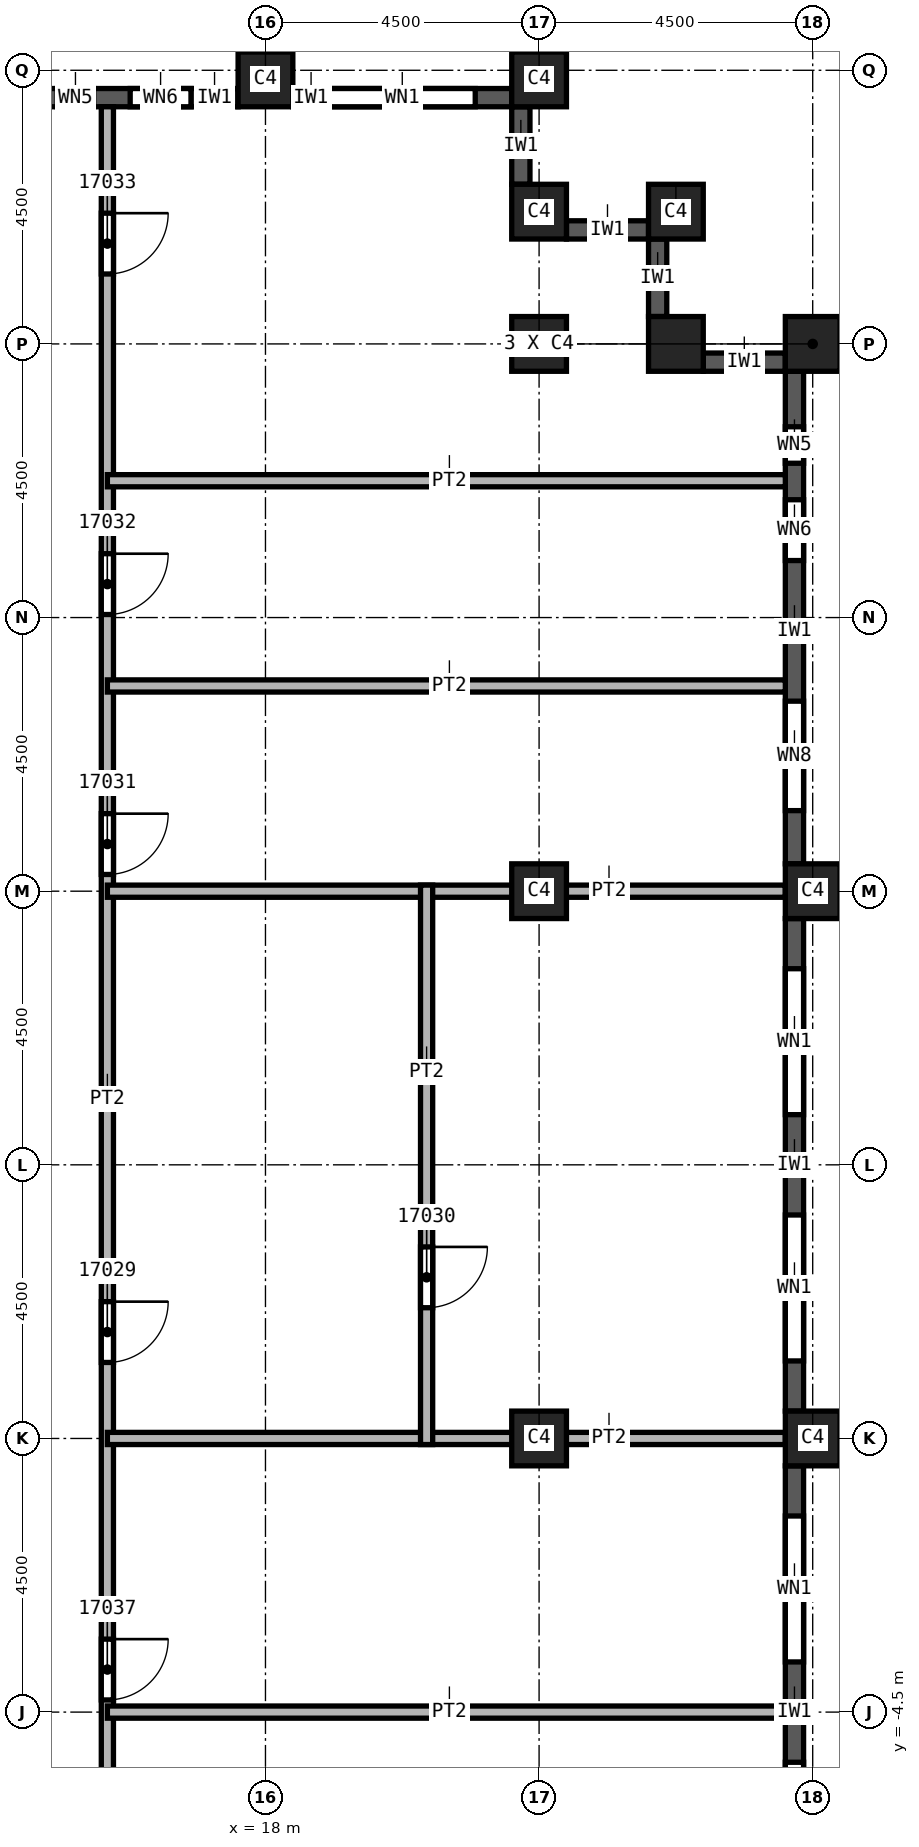
"""IFC4 building model, lengths in metres.
Left out: names, types, materials, properties, quantities, classifications, styles, units other than length and angle.
Written with IfcOpenShell. Run it as: python <this file> out.ifc"""

import sys

from ifc_helpers import new_model, si_unit, direction, frame, frame_2d, origin, origin_2d, place, context, subcontext, project, spatial, rectangle, extrude, element, fill, save


model = new_model("IFC4")
c1 = context("Model", 3, precision=1e-05, world=origin(), true_north=direction((0.0, 1.0)))
c2 = subcontext(c1, "Body", "Model", "MODEL_VIEW")
j1 = project(units=[si_unit("LENGTHUNIT", "METRE"), si_unit("PLANEANGLEUNIT", "RADIAN")], contexts=[c1])
p1 = place(None, origin())
s1 = spatial("IfcSite", under=j1, at=p1, CompositionType="ELEMENT")
p2 = place(p1, origin())
s2 = spatial("IfcBuilding", under=s1, at=p2, CompositionType="ELEMENT")
p3 = place(p2, frame((0.0, 0.0, 254.0)))
s3 = spatial("IfcBuildingStorey", under=s2, at=p3, CompositionType="ELEMENT", Elevation=254.0)
for number, where, z_axis, x_axis in (
    (1, (22.5, 0.0, 0.0), (0.0, 0.0, 1.0), (1.0, 0.0, 0.0)),
    (2, (22.5, 9.0, 0.0), (0.0, 0.0, 1.0), (1.0, 0.0, 0.0)),
    (3, (22.5, 18.0, 0.0), (0.0, 0.0, 1.0), (1.0, 0.0, 0.0)),
    (4, (27.0, 0.0, 0.0), (0.0, 0.0, 1.0), (0.0, 1.0, 0.0)),
    (5, (27.0, 9.0, 0.0), (0.0, 0.0, 1.0), (0.0, 1.0, 0.0)),
    (6, (27.0, 18.0, 0.0), (0.0, 0.0, 1.0), (0.0, 1.0, 0.0)),
    (7, (18.0, 22.35, 0.0), (0.0, 0.0, 1.0), (1.0, 0.0, 0.0)),
    (8, (22.5, 22.35, 0.0), (0.0, 0.0, 1.0), (1.0, 0.0, 0.0)),
    (9, (22.5, 20.175, 0.0), (0.0, 0.0, 1.0), (1.0, 0.0, 0.0)),
    (10, (24.75, 20.175, 0.0), (0.0, 0.0, 1.0), (1.0, 0.0, 0.0)),
    (11, (24.75, 18.0, 0.0), (0.0, 0.0, 1.0), (1.0, 0.0, 0.0)),
):
    element("IfcColumn", number, at=place(p3, frame(where, z_axis=z_axis, x_axis=x_axis)), inside=s3, PredefinedType="COLUMN", context=c2, shape_type="SweptSolid", body=[
        extrude(rectangle(XDim=0.9, YDim=0.9, at=origin_2d()), origin(), (0.0, 0.0, 1.0), 3.72),
    ])
p4 = place(p3, frame((26.7, -8.55, 0.0), z_axis=(0.0, 0.0, 1.0), x_axis=(0.0, 1.0, 0.0)))
e12 = element("IfcWall", 12, at=p4, inside=s3, PredefinedType="SOLIDWALL", context=c2, shape_type="SweptSolid", body=[
    extrude(rectangle(XDim=8.1, YDim=0.3, at=frame_2d((4.05, 0.0))), origin(), (0.0, 0.0, 1.0), 3.12),
])
p5 = place(p4, frame((0.825, 0.0, 0.8)))
e13 = element("IfcOpeningElement", 13, at=p5, cuts=e12, PredefinedType="OPENING", context=c2, shape_type="SweptSolid", body=[
    extrude(rectangle(XDim=2.4, YDim=1.95, at=frame_2d((1.2, 0.975))), frame((0.0, 0.15, 0.0), z_axis=(0.0, -1.0, 0.0), x_axis=(1.0, 0.0, 0.0)), (0.0, 0.0, 1.0), 0.3),
])
p6 = place(p4, frame((4.875, 0.0, 0.8)))
e14 = element("IfcOpeningElement", 14, at=p6, cuts=e12, PredefinedType="OPENING", context=c2, shape_type="SweptSolid", body=[
    extrude(rectangle(XDim=2.4, YDim=1.95, at=frame_2d((1.2, 0.975))), frame((0.0, 0.15, 0.0), z_axis=(0.0, -1.0, 0.0), x_axis=(1.0, 0.0, 0.0)), (0.0, 0.0, 1.0), 0.3),
])
p7 = place(p3, frame((26.7, 0.45, 0.0), z_axis=(0.0, 0.0, 1.0), x_axis=(0.0, 1.0, 0.0)))
e15 = element("IfcWall", 15, at=p7, inside=s3, PredefinedType="SOLIDWALL", context=c2, shape_type="SweptSolid", body=[
    extrude(rectangle(XDim=8.1, YDim=0.3, at=frame_2d((4.05, 0.0))), origin(), (0.0, 0.0, 1.0), 3.12),
])
p8 = place(p7, frame((0.825, 0.0, 0.8)))
e16 = element("IfcOpeningElement", 16, at=p8, cuts=e15, PredefinedType="OPENING", context=c2, shape_type="SweptSolid", body=[
    extrude(rectangle(XDim=2.4, YDim=1.95, at=frame_2d((1.2, 0.975))), frame((0.0, 0.15, 0.0), z_axis=(0.0, -1.0, 0.0), x_axis=(1.0, 0.0, 0.0)), (0.0, 0.0, 1.0), 0.3),
])
p9 = place(p7, frame((4.875, 0.0, 0.8)))
e17 = element("IfcOpeningElement", 17, at=p9, cuts=e15, PredefinedType="OPENING", context=c2, shape_type="SweptSolid", body=[
    extrude(rectangle(XDim=2.4, YDim=1.95, at=frame_2d((1.2, 0.975))), frame((0.0, 0.15, 0.0), z_axis=(0.0, -1.0, 0.0), x_axis=(1.0, 0.0, 0.0)), (0.0, 0.0, 1.0), 0.3),
])
p10 = place(p3, frame((26.7, 9.45, 0.0), z_axis=(0.0, 0.0, 1.0), x_axis=(0.0, 1.0, 0.0)))
e18 = element("IfcWall", 18, at=p10, inside=s3, PredefinedType="SOLIDWALL", context=c2, shape_type="SweptSolid", body=[
    extrude(rectangle(XDim=8.1, YDim=0.3, at=frame_2d((4.05, 0.0))), origin(), (0.0, 0.0, 1.0), 3.12),
])
p11 = place(p10, frame((0.875, 0.0, 0.8)))
e19 = element("IfcOpeningElement", 19, at=p11, cuts=e18, PredefinedType="OPENING", context=c2, shape_type="SweptSolid", body=[
    extrude(rectangle(XDim=1.8, YDim=1.95, at=frame_2d((0.9, 0.975))), frame((0.0, 0.15, 0.0), z_axis=(0.0, -1.0, 0.0), x_axis=(1.0, 0.0, 0.0)), (0.0, 0.0, 1.0), 0.3),
])
p12 = place(p10, frame((4.988, 0.0, 0.8)))
e20 = element("IfcOpeningElement", 20, at=p12, cuts=e18, PredefinedType="OPENING", context=c2, shape_type="SweptSolid", body=[
    extrude(rectangle(XDim=1.0, YDim=1.95, at=frame_2d((0.5, 0.975))), frame((0.0, 0.15, 0.0), z_axis=(0.0, -1.0, 0.0), x_axis=(1.0, 0.0, 0.0)), (0.0, 0.0, 1.0), 0.3),
])
p13 = place(p10, frame((6.587, 0.0, 0.8)))
e21 = element("IfcOpeningElement", 21, at=p13, cuts=e18, PredefinedType="OPENING", context=c2, shape_type="SweptSolid", body=[
    extrude(rectangle(XDim=0.6, YDim=1.95, at=frame_2d((0.3, 0.975))), frame((0.0, 0.15, 0.0), z_axis=(0.0, -1.0, 0.0), x_axis=(1.0, 0.0, 0.0)), (0.0, 0.0, 1.0), 0.3),
])
p14 = place(p3, frame((26.55, 17.7, 0.0), z_axis=(0.0, 0.0, 1.0), x_axis=(-1.0, 0.0, 0.0)))
e22 = element("IfcWall", 22, at=p14, inside=s3, PredefinedType="SOLIDWALL", context=c2, shape_type="SweptSolid", body=[
    extrude(rectangle(XDim=1.35, YDim=0.3, at=frame_2d((0.675, 0.0))), origin(), (0.0, 0.0, 1.0), 3.12),
])
p15 = place(p3, frame((24.45, 18.45, 0.0), z_axis=(0.0, 0.0, 1.0), x_axis=(0.0, 1.0, 0.0)))
e23 = element("IfcWall", 23, at=p15, inside=s3, PredefinedType="SOLIDWALL", context=c2, shape_type="SweptSolid", body=[
    extrude(rectangle(XDim=1.275, YDim=0.3, at=frame_2d((0.638, 0.0))), origin(), (0.0, 0.0, 1.0), 3.12),
])
p16 = place(p3, frame((24.3, 19.875, 0.0), z_axis=(0.0, 0.0, 1.0), x_axis=(-1.0, 0.0, 0.0)))
e24 = element("IfcWall", 24, at=p16, inside=s3, PredefinedType="SOLIDWALL", context=c2, shape_type="SweptSolid", body=[
    extrude(rectangle(XDim=1.35, YDim=0.3, at=frame_2d((0.675, 0.0))), origin(), (0.0, 0.0, 1.0), 3.12),
])
p17 = place(p3, frame((22.2, 20.625, 0.0), z_axis=(0.0, 0.0, 1.0), x_axis=(0.0, 1.0, 0.0)))
e25 = element("IfcWall", 25, at=p17, inside=s3, PredefinedType="SOLIDWALL", context=c2, shape_type="SweptSolid", body=[
    extrude(rectangle(XDim=1.275, YDim=0.3, at=frame_2d((0.637, 0.0))), origin(), (0.0, 0.0, 1.0), 3.12),
])
p18 = place(p3, frame((22.05, 22.05, 0.0), z_axis=(0.0, 0.0, 1.0), x_axis=(-1.0, 0.0, 0.0)))
e26 = element("IfcWall", 26, at=p18, inside=s3, PredefinedType="SOLIDWALL", context=c2, shape_type="SweptSolid", body=[
    extrude(rectangle(XDim=3.6, YDim=0.3, at=frame_2d((1.8, 0.0))), origin(), (0.0, 0.0, 1.0), 3.12),
])
p19 = place(p18, frame((0.6, 0.0, 0.8)))
e27 = element("IfcOpeningElement", 27, at=p19, cuts=e26, PredefinedType="OPENING", context=c2, shape_type="SweptSolid", body=[
    extrude(rectangle(XDim=2.4, YDim=1.95, at=frame_2d((1.2, 0.975))), frame((0.0, 0.15, 0.0), z_axis=(0.0, -1.0, 0.0), x_axis=(1.0, 0.0, 0.0)), (0.0, 0.0, 1.0), 0.3),
])
p20 = place(p3, frame((17.55, 22.05, 0.0), z_axis=(0.0, 0.0, 1.0), x_axis=(-1.0, 0.0, 0.0)))
e28 = element("IfcWall", 28, at=p20, inside=s3, PredefinedType="SOLIDWALL", context=c2, shape_type="SweptSolid", body=[
    extrude(rectangle(XDim=3.6, YDim=0.3, at=frame_2d((1.8, 0.0))), origin(), (0.0, 0.0, 1.0), 3.12),
])
p21 = place(p20, frame((0.775, 0.0, 0.8)))
e29 = element("IfcOpeningElement", 29, at=p21, cuts=e28, PredefinedType="OPENING", context=c2, shape_type="SweptSolid", body=[
    extrude(rectangle(XDim=1.0, YDim=1.95, at=frame_2d((0.5, 0.975))), frame((0.0, 0.15, 0.0), z_axis=(0.0, -1.0, 0.0), x_axis=(1.0, 0.0, 0.0)), (0.0, 0.0, 1.0), 0.3),
])
p22 = place(p20, frame((2.375, 0.0, 0.8)))
e30 = element("IfcOpeningElement", 30, at=p22, cuts=e28, PredefinedType="OPENING", context=c2, shape_type="SweptSolid", body=[
    extrude(rectangle(XDim=0.6, YDim=1.95, at=frame_2d((0.3, 0.975))), frame((0.0, 0.15, 0.0), z_axis=(0.0, -1.0, 0.0), x_axis=(1.0, 0.0, 0.0)), (0.0, 0.0, 1.0), 0.3),
])
p23 = place(p3, frame((15.4, 21.9, 0.0), z_axis=(0.0, 0.0, 1.0), x_axis=(0.0, -1.0, 0.0)))
e31 = element("IfcWall", 31, at=p23, inside=s3, PredefinedType="PARTITIONING", context=c2, shape_type="SweptSolid", body=[
    extrude(rectangle(XDim=43.8, YDim=0.2, at=frame_2d((21.9, 0.0))), origin(), (0.0, 0.0, 1.0), 3.72),
])
p24 = place(p23, frame((19.65, 0.0, 0.0)))
e32 = element("IfcOpeningElement", 32, at=p24, cuts=e31, PredefinedType="OPENING", context=c2, shape_type="SweptSolid", body=[
    extrude(rectangle(XDim=1.0, YDim=2.1, at=frame_2d((0.5, 1.05))), frame((0.0, 0.1, 0.0), z_axis=(0.0, -1.0, 0.0), x_axis=(1.0, 0.0, 0.0)), (0.0, 0.0, 1.0), 0.2),
])
p25 = place(p23, frame((11.625, 0.0, 0.0)))
e33 = element("IfcOpeningElement", 33, at=p25, cuts=e31, PredefinedType="OPENING", context=c2, shape_type="SweptSolid", body=[
    extrude(rectangle(XDim=1.0, YDim=2.1, at=frame_2d((0.5, 1.05))), frame((0.0, 0.1, 0.0), z_axis=(0.0, -1.0, 0.0), x_axis=(1.0, 0.0, 0.0)), (0.0, 0.0, 1.0), 0.2),
])
p26 = place(p23, frame((7.35, 0.0, 0.0)))
e34 = element("IfcOpeningElement", 34, at=p26, cuts=e31, PredefinedType="OPENING", context=c2, shape_type="SweptSolid", body=[
    extrude(rectangle(XDim=1.0, YDim=2.1, at=frame_2d((0.5, 1.05))), frame((0.0, 0.1, 0.0), z_axis=(0.0, -1.0, 0.0), x_axis=(1.0, 0.0, 0.0)), (0.0, 0.0, 1.0), 0.2),
])
p27 = place(p23, frame((1.75, 0.0, 0.0)))
e35 = element("IfcOpeningElement", 35, at=p27, cuts=e31, PredefinedType="OPENING", context=c2, shape_type="SweptSolid", body=[
    extrude(rectangle(XDim=1.0, YDim=2.1, at=frame_2d((0.5, 1.05))), frame((0.0, 0.1, 0.0), z_axis=(0.0, -1.0, 0.0), x_axis=(1.0, 0.0, 0.0)), (0.0, 0.0, 1.0), 0.2),
])
p28 = place(p23, frame((37.2, 0.0, 0.0)))
e36 = element("IfcOpeningElement", 36, at=p28, cuts=e31, PredefinedType="OPENING", context=c2, shape_type="SweptSolid", body=[
    extrude(rectangle(XDim=1.0, YDim=2.1, at=frame_2d((0.5, 1.05))), frame((0.0, 0.1, 0.0), z_axis=(0.0, -1.0, 0.0), x_axis=(1.0, 0.0, 0.0)), (0.0, 0.0, 1.0), 0.2),
])
p29 = place(p23, frame((31.8, 0.0, 0.0)))
e37 = element("IfcOpeningElement", 37, at=p29, cuts=e31, PredefinedType="OPENING", context=c2, shape_type="SweptSolid", body=[
    extrude(rectangle(XDim=1.0, YDim=2.1, at=frame_2d((0.5, 1.05))), frame((0.0, 0.1, 0.0), z_axis=(0.0, -1.0, 0.0), x_axis=(1.0, 0.0, 0.0)), (0.0, 0.0, 1.0), 0.2),
])
p30 = place(p23, frame((25.2, 0.0, 0.0)))
e38 = element("IfcOpeningElement", 38, at=p30, cuts=e31, PredefinedType="OPENING", context=c2, shape_type="SweptSolid", body=[
    extrude(rectangle(XDim=1.0, YDim=2.1, at=frame_2d((0.5, 1.05))), frame((0.0, 0.1, 0.0), z_axis=(0.0, -1.0, 0.0), x_axis=(1.0, 0.0, 0.0)), (0.0, 0.0, 1.0), 0.2),
])
for number, where, z_axis, x_axis in (
    (39, (15.4, -4.5, 0.0), (0.0, 0.0, 1.0), (1.0, 0.0, 0.0)),
    (40, (15.4, 9.0, 0.0), (0.0, 0.0, 1.0), (1.0, 0.0, 0.0)),
    (41, (15.4, 12.375, 0.0), (0.0, 0.0, 1.0), (1.0, 0.0, 0.0)),
    (42, (15.4, 15.75, 0.0), (0.0, 0.0, 1.0), (1.0, 0.0, 0.0)),
    (43, (26.55, 0.0, 0.0), (0.0, 0.0, 1.0), (-1.0, 0.0, 0.0)),
):
    element("IfcWall", number, at=place(p3, frame(where, z_axis=z_axis, x_axis=x_axis)), inside=s3, PredefinedType="PARTITIONING", context=c2, shape_type="SweptSolid", body=[
        extrude(rectangle(XDim=11.15, YDim=0.2, at=frame_2d((5.575, 0.0))), origin(), (0.0, 0.0, 1.0), 3.72),
    ])
p31 = place(p3, frame((20.65, 9.1, 0.0), z_axis=(0.0, 0.0, 1.0), x_axis=(0.0, -1.0, 0.0)))
e44 = element("IfcWall", 44, at=p31, inside=s3, PredefinedType="PARTITIONING", context=c2, shape_type="SweptSolid", body=[
    extrude(rectangle(XDim=9.2, YDim=0.2, at=frame_2d((4.6, 0.0))), origin(), (0.0, 0.0, 1.0), 3.72),
])
p32 = place(p31, frame((5.95, 0.0, 0.0)))
e45 = element("IfcOpeningElement", 45, at=p32, cuts=e44, PredefinedType="OPENING", context=c2, shape_type="SweptSolid", body=[
    extrude(rectangle(XDim=1.0, YDim=2.1, at=frame_2d((0.5, 1.05))), frame((0.0, 0.1, 0.0), z_axis=(0.0, -1.0, 0.0), x_axis=(1.0, 0.0, 0.0)), (0.0, 0.0, 1.0), 0.2),
])
p33 = place(p5, origin())
e46 = element("IfcWindow", 46, at=p33, inside=s3, PartitioningType="SINGLE_PANEL", PredefinedType="WINDOW", context=c2, shape_type="SweptSolid", body=[
    extrude(rectangle(XDim=2.4, YDim=1.95, at=frame_2d((1.2, 0.975))), frame((0.0, 0.03, 0.0), z_axis=(0.0, -1.0, 0.0), x_axis=(1.0, 0.0, 0.0)), (0.0, 0.0, 1.0), 0.06),
])
fill(e13, e46)
p34 = place(p6, origin())
e47 = element("IfcWindow", 47, at=p34, inside=s3, PartitioningType="SINGLE_PANEL", PredefinedType="WINDOW", context=c2, shape_type="SweptSolid", body=[
    extrude(rectangle(XDim=2.4, YDim=1.95, at=frame_2d((1.2, 0.975))), frame((0.0, 0.03, 0.0), z_axis=(0.0, -1.0, 0.0), x_axis=(1.0, 0.0, 0.0)), (0.0, 0.0, 1.0), 0.06),
])
fill(e14, e47)
p35 = place(p8, origin())
e48 = element("IfcWindow", 48, at=p35, inside=s3, PartitioningType="SINGLE_PANEL", PredefinedType="WINDOW", context=c2, shape_type="SweptSolid", body=[
    extrude(rectangle(XDim=2.4, YDim=1.95, at=frame_2d((1.2, 0.975))), frame((0.0, 0.03, 0.0), z_axis=(0.0, -1.0, 0.0), x_axis=(1.0, 0.0, 0.0)), (0.0, 0.0, 1.0), 0.06),
])
fill(e16, e48)
p36 = place(p9, origin())
e49 = element("IfcWindow", 49, at=p36, inside=s3, PartitioningType="SINGLE_PANEL", PredefinedType="WINDOW", context=c2, shape_type="SweptSolid", body=[
    extrude(rectangle(XDim=2.4, YDim=1.95, at=frame_2d((1.2, 0.975))), frame((0.0, 0.03, 0.0), z_axis=(0.0, -1.0, 0.0), x_axis=(1.0, 0.0, 0.0)), (0.0, 0.0, 1.0), 0.06),
])
fill(e17, e49)
p37 = place(p19, origin())
e50 = element("IfcWindow", 50, at=p37, inside=s3, PartitioningType="SINGLE_PANEL", PredefinedType="WINDOW", context=c2, shape_type="SweptSolid", body=[
    extrude(rectangle(XDim=2.4, YDim=1.95, at=frame_2d((1.2, 0.975))), frame((0.0, 0.03, 0.0), z_axis=(0.0, -1.0, 0.0), x_axis=(1.0, 0.0, 0.0)), (0.0, 0.0, 1.0), 0.06),
])
fill(e27, e50)
p38 = place(p24, origin())
e51 = element("IfcDoor", 51, at=p38, inside=s3, OperationType="SINGLE_SWING_RIGHT", PredefinedType="DOOR", context=c2, shape_type="SweptSolid", body=[
    extrude(rectangle(XDim=1.0, YDim=2.1, at=frame_2d((0.5, 1.05))), frame((0.0, 0.025, 0.0), z_axis=(0.0, -1.0, 0.0), x_axis=(1.0, 0.0, 0.0)), (0.0, 0.0, 1.0), 0.05),
])
fill(e32, e51)
p39 = place(p32, origin())
e52 = element("IfcDoor", 52, at=p39, inside=s3, OperationType="SINGLE_SWING_LEFT", PredefinedType="DOOR", context=c2, shape_type="SweptSolid", body=[
    extrude(rectangle(XDim=1.0, YDim=2.1, at=frame_2d((0.5, 1.05))), frame((0.0, 0.025, 0.0), z_axis=(0.0, -1.0, 0.0), x_axis=(1.0, 0.0, 0.0)), (0.0, 0.0, 1.0), 0.05),
])
fill(e45, e52)
p40 = place(p25, origin())
e53 = element("IfcDoor", 53, at=p40, inside=s3, OperationType="SINGLE_SWING_RIGHT", PredefinedType="DOOR", context=c2, shape_type="SweptSolid", body=[
    extrude(rectangle(XDim=1.0, YDim=2.1, at=frame_2d((0.5, 1.05))), frame((0.0, 0.025, 0.0), z_axis=(0.0, -1.0, 0.0), x_axis=(1.0, 0.0, 0.0)), (0.0, 0.0, 1.0), 0.05),
])
fill(e33, e53)
p41 = place(p26, origin())
e54 = element("IfcDoor", 54, at=p41, inside=s3, OperationType="SINGLE_SWING_LEFT", PredefinedType="DOOR", context=c2, shape_type="SweptSolid", body=[
    extrude(rectangle(XDim=1.0, YDim=2.1, at=frame_2d((0.5, 1.05))), frame((0.0, 0.025, 0.0), z_axis=(0.0, -1.0, 0.0), x_axis=(1.0, 0.0, 0.0)), (0.0, 0.0, 1.0), 0.05),
])
fill(e34, e54)
p42 = place(p27, origin())
e55 = element("IfcDoor", 55, at=p42, inside=s3, OperationType="SINGLE_SWING_RIGHT", PredefinedType="DOOR", context=c2, shape_type="SweptSolid", body=[
    extrude(rectangle(XDim=1.0, YDim=2.1, at=frame_2d((0.5, 1.05))), frame((0.0, 0.025, 0.0), z_axis=(0.0, -1.0, 0.0), x_axis=(1.0, 0.0, 0.0)), (0.0, 0.0, 1.0), 0.05),
])
fill(e35, e55)
p43 = place(p30, origin())
e56 = element("IfcDoor", 56, at=p43, inside=s3, OperationType="SINGLE_SWING_RIGHT", PredefinedType="DOOR", context=c2, shape_type="SweptSolid", body=[
    extrude(rectangle(XDim=1.0, YDim=2.1, at=frame_2d((0.5, 1.05))), frame((0.0, 0.025, 0.0), z_axis=(0.0, -1.0, 0.0), x_axis=(1.0, 0.0, 0.0)), (0.0, 0.0, 1.0), 0.05),
])
fill(e38, e56)
p44 = place(p11, origin())
e57 = element("IfcWindow", 57, at=p44, inside=s3, PartitioningType="SINGLE_PANEL", PredefinedType="WINDOW", context=c2, shape_type="SweptSolid", body=[
    extrude(rectangle(XDim=1.8, YDim=1.95, at=frame_2d((0.9, 0.975))), frame((0.0, 0.03, 0.0), z_axis=(0.0, -1.0, 0.0), x_axis=(1.0, 0.0, 0.0)), (0.0, 0.0, 1.0), 0.06),
])
fill(e19, e57)
p45 = place(p12, origin())
e58 = element("IfcWindow", 58, at=p45, inside=s3, PartitioningType="SINGLE_PANEL", PredefinedType="WINDOW", context=c2, shape_type="SweptSolid", body=[
    extrude(rectangle(XDim=1.0, YDim=1.95, at=frame_2d((0.5, 0.975))), frame((0.0, 0.03, 0.0), z_axis=(0.0, -1.0, 0.0), x_axis=(1.0, 0.0, 0.0)), (0.0, 0.0, 1.0), 0.06),
])
fill(e20, e58)
p46 = place(p13, origin())
e59 = element("IfcWindow", 59, at=p46, inside=s3, PartitioningType="SINGLE_PANEL", PredefinedType="WINDOW", context=c2, shape_type="SweptSolid", body=[
    extrude(rectangle(XDim=0.6, YDim=1.95, at=frame_2d((0.3, 0.975))), frame((0.0, 0.03, 0.0), z_axis=(0.0, -1.0, 0.0), x_axis=(1.0, 0.0, 0.0)), (0.0, 0.0, 1.0), 0.06),
])
fill(e21, e59)
p47 = place(p21, origin())
e60 = element("IfcWindow", 60, at=p47, inside=s3, PartitioningType="SINGLE_PANEL", PredefinedType="WINDOW", context=c2, shape_type="SweptSolid", body=[
    extrude(rectangle(XDim=1.0, YDim=1.95, at=frame_2d((0.5, 0.975))), frame((0.0, 0.03, 0.0), z_axis=(0.0, -1.0, 0.0), x_axis=(1.0, 0.0, 0.0)), (0.0, 0.0, 1.0), 0.06),
])
fill(e29, e60)
p48 = place(p22, origin())
e61 = element("IfcWindow", 61, at=p48, inside=s3, PartitioningType="SINGLE_PANEL", PredefinedType="WINDOW", context=c2, shape_type="SweptSolid", body=[
    extrude(rectangle(XDim=0.6, YDim=1.95, at=frame_2d((0.3, 0.975))), frame((0.0, 0.03, 0.0), z_axis=(0.0, -1.0, 0.0), x_axis=(1.0, 0.0, 0.0)), (0.0, 0.0, 1.0), 0.06),
])
fill(e30, e61)
save(model, sys.argv[1])
